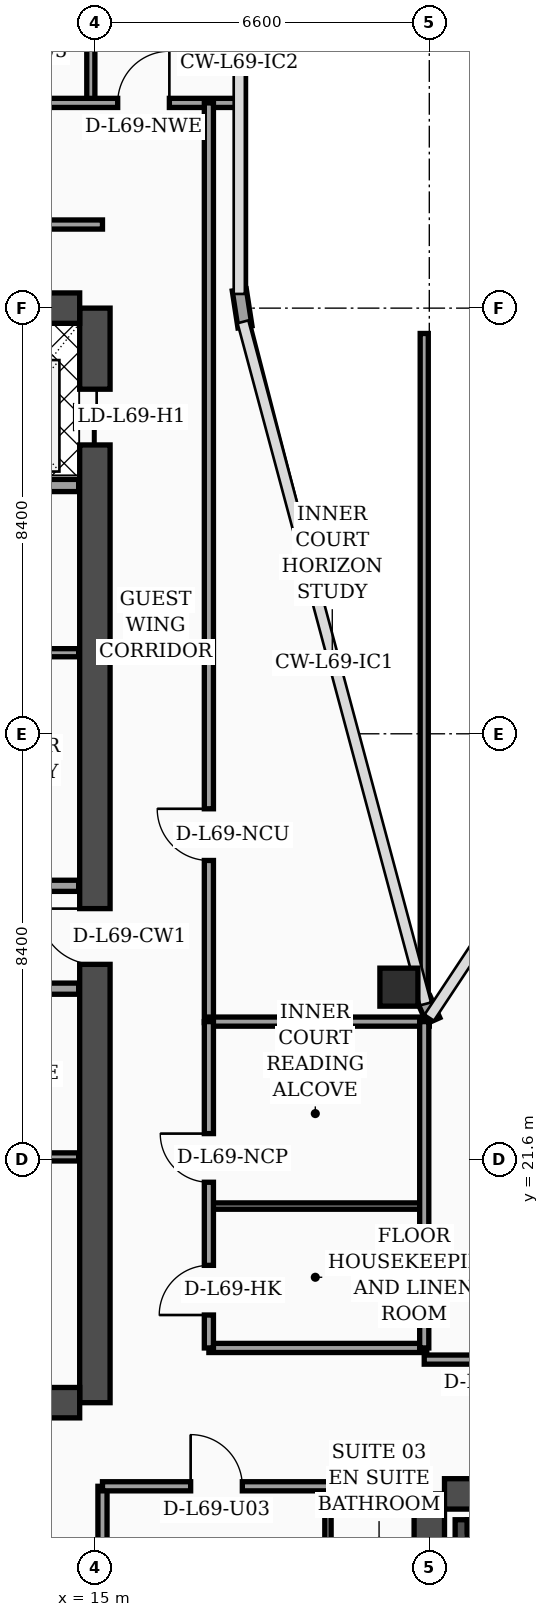
"""IFC4 building model, lengths in metres.
Left out: names, types, materials, properties, quantities, classifications, styles, units other than length and angle.
Written with IfcOpenShell. Run it as: python <this file> out.ifc"""

import sys

from ifc_helpers import new_model, si_unit, direction, frame, frame_2d, origin, origin_2d, place, context, subcontext, project, spatial, rectangle, hollow_rectangle, extrude, element, fill, save


model = new_model("IFC4")
c1 = context("Model", 3, precision=1e-05, world=origin(), true_north=direction((0.0, 1.0)))
c2 = subcontext(c1, "Body", "Model", "MODEL_VIEW")
j1 = project(units=[si_unit("LENGTHUNIT", "METRE"), si_unit("PLANEANGLEUNIT", "RADIAN")], contexts=[c1])
p1 = place(None, origin())
s1 = spatial("IfcSite", under=j1, at=p1, CompositionType="ELEMENT")
p2 = place(p1, origin())
s2 = spatial("IfcBuilding", under=s1, at=p2, CompositionType="ELEMENT")
p3 = place(p2, frame((0.0, 0.0, 278.7)))
s3 = spatial("IfcBuildingStorey", under=s2, at=p3, CompositionType="ELEMENT", Elevation=278.7)
p4 = place(p3, frame((15.0, 16.8, 0.0), z_axis=(0.0, 0.0, 1.0), x_axis=(0.0, 1.0, 0.0)))
e1 = element("IfcWall", 1, at=p4, inside=s3, PredefinedType="SHEAR", context=c2, shape_type="SweptSolid", body=[
    extrude(rectangle(XDim=21.6, YDim=0.6, at=frame_2d((10.8, 0.0))), origin(), (0.0, 0.0, 1.0), 3.52),
])
p5 = place(p4, frame((8.65, 0.0, 0.0)))
e2 = element("IfcOpeningElement", 2, at=p5, cuts=e1, PredefinedType="OPENING", context=c2, shape_type="SweptSolid", body=[
    extrude(rectangle(XDim=1.1, YDim=2.2, at=frame_2d((0.55, 1.1))), frame((0.0, 0.31, 0.0), z_axis=(0.0, -1.0, 0.0), x_axis=(1.0, 0.0, 0.0)), (0.0, 0.0, 1.0), 0.62),
])
p6 = place(p4, frame((18.9, 0.0, 0.0)))
e3 = element("IfcOpeningElement", 3, at=p6, cuts=e1, PredefinedType="OPENING", context=c2, shape_type="SweptSolid", body=[
    extrude(rectangle(XDim=1.1, YDim=2.2, at=frame_2d((0.55, 1.1))), frame((0.0, 0.31, 0.0), z_axis=(0.0, -1.0, 0.0), x_axis=(1.0, 0.0, 0.0)), (0.0, 0.0, 1.0), 0.62),
])
p7 = place(p3, frame((4.5, 38.4, 0.0), z_axis=(0.0, 0.0, 1.0), x_axis=(1.0, 0.0, 0.0)))
e4 = element("IfcWall", 4, at=p7, inside=s3, PredefinedType="SHEAR", context=c2, shape_type="SweptSolid", body=[
    extrude(rectangle(XDim=10.2, YDim=0.6, at=frame_2d((5.1, 0.0))), origin(), (0.0, 0.0, 1.0), 3.52),
])
p8 = place(p7, frame((5.8, 0.0, 0.0)))
e5 = element("IfcOpeningElement", 5, at=p8, cuts=e4, PredefinedType="OPENING", context=c2, shape_type="SweptSolid", body=[
    extrude(rectangle(XDim=1.1, YDim=2.2, at=frame_2d((0.55, 1.1))), frame((0.0, 0.31, 0.0), z_axis=(0.0, -1.0, 0.0), x_axis=(1.0, 0.0, 0.0)), (0.0, 0.0, 1.0), 0.62),
])
p9 = place(p3, frame((4.5, 16.8, 0.0), z_axis=(0.0, 0.0, 1.0), x_axis=(1.0, 0.0, 0.0)))
e6 = element("IfcWall", 6, at=p9, inside=s3, PredefinedType="SHEAR", context=c2, shape_type="SweptSolid", body=[
    extrude(rectangle(XDim=10.2, YDim=0.6, at=frame_2d((5.1, 0.0))), origin(), (0.0, 0.0, 1.0), 3.52),
])
p10 = place(p3, frame((21.6, 4.6, 0.0), z_axis=(0.0, 0.0, 1.0), x_axis=(0.0, 1.0, 0.0)))
e7 = element("IfcWall", 7, at=p10, inside=s3, PredefinedType="SHEAR", context=c2, shape_type="SweptSolid", body=[
    extrude(rectangle(XDim=10.4, YDim=0.6, at=frame_2d((5.2, 0.0))), origin(), (0.0, 0.0, 1.0), 3.52),
])
p11 = place(p3, frame((21.9, 15.0, 0.0), z_axis=(0.0, 0.0, 1.0), x_axis=(1.0, 0.0, 0.0)))
e8 = element("IfcWall", 8, at=p11, inside=s3, PredefinedType="SHEAR", context=c2, shape_type="SweptSolid", body=[
    extrude(rectangle(XDim=10.2, YDim=0.6, at=frame_2d((5.1, 0.0))), origin(), (0.0, 0.0, 1.0), 3.52),
])
p12 = place(p11, frame((5.0, 0.0, 0.0)))
e9 = element("IfcOpeningElement", 9, at=p12, cuts=e8, PredefinedType="OPENING", context=c2, shape_type="SweptSolid", body=[
    extrude(rectangle(XDim=1.1, YDim=2.2, at=frame_2d((0.55, 1.1))), frame((0.0, 0.31, 0.0), z_axis=(0.0, -1.0, 0.0), x_axis=(1.0, 0.0, 0.0)), (0.0, 0.0, 1.0), 0.62),
])
p13 = place(p3, frame((22.23, 4.9, 0.0), z_axis=(0.0, 0.0, 1.0), x_axis=(0.0, 1.0, 0.0)))
e10 = element("IfcWall", 10, at=p13, inside=s3, PredefinedType="SOLIDWALL", context=c2, shape_type="SweptSolid", body=[
    extrude(rectangle(XDim=9.59, YDim=0.24, at=frame_2d((4.795, 0.0))), origin(), (0.0, 0.0, 1.0), 3.52),
])
p14 = place(p3, frame((22.35, 14.37, 0.0), z_axis=(0.0, 0.0, 1.0), x_axis=(1.0, 0.0, 0.0)))
e11 = element("IfcWall", 11, at=p14, inside=s3, PredefinedType="SOLIDWALL", context=c2, shape_type="SweptSolid", body=[
    extrude(rectangle(XDim=3.1, YDim=0.24, at=frame_2d((1.55, 0.0))), origin(), (0.0, 0.0, 1.0), 3.52),
])
p15 = place(p3, frame((21.0, 25.0, 0.0), z_axis=(0.0, 0.0, 1.0), x_axis=(1.0, 0.0, 0.0)))
e12 = element("IfcColumn", 12, at=p15, inside=s3, PredefinedType="COLUMN", context=c2, shape_type="SweptSolid", body=[
    extrude(hollow_rectangle(XDim=0.75, YDim=0.75, WallThickness=0.032, at=origin_2d()), origin(), (0.0, 0.0, 1.0), 3.52),
])
p16 = place(p3, frame((21.68, 24.34, 0.0), z_axis=(0.0, 0.0, 1.0), x_axis=(-0.40758134973, 0.913168901875, 0.0)))
e13 = element("IfcWall", 13, at=p16, inside=s3, PredefinedType="SOLIDWALL", context=c2, shape_type="SweptSolid", body=[
    extrude(rectangle(XDim=0.471, YDim=0.28, at=frame_2d((0.235, 0.0))), origin(), (0.0, 0.0, 1.0), 3.52),
])
p17 = place(p3, frame((17.962, 38.03, 0.0), z_axis=(0.0, 0.0, 1.0), x_axis=(-0.15141125477, 0.988470855377, 0.0)))
e14 = element("IfcWall", 14, at=p17, inside=s3, PredefinedType="SOLIDWALL", context=c2, shape_type="SweptSolid", body=[
    extrude(rectangle(XDim=0.739, YDim=0.28, at=frame_2d((0.369, 0.0))), origin(), (0.0, 0.0, 1.0), 3.52),
])
p18 = place(p3, frame((9.68, 21.65, 0.0), z_axis=(0.0, 0.0, 1.0), x_axis=(1.0, 0.0, 0.0)))
e15 = element("IfcWall", 15, at=p18, inside=s3, PredefinedType="PARTITIONING", context=c2, shape_type="SweptSolid", body=[
    extrude(rectangle(XDim=5.0, YDim=0.16, at=frame_2d((2.5, 0.0))), origin(), (0.0, 0.0, 1.0), 3.52),
])
p19 = place(p18, frame((1.1, 0.0, 0.0)))
e16 = element("IfcOpeningElement", 16, at=p19, cuts=e15, PredefinedType="OPENING", context=c2, shape_type="SweptSolid", body=[
    extrude(rectangle(XDim=0.98, YDim=2.15, at=frame_2d((0.49, 1.075))), frame((0.0, 0.09, 0.0), z_axis=(0.0, -1.0, 0.0), x_axis=(1.0, 0.0, 0.0)), (0.0, 0.0, 1.0), 0.18),
])
p20 = place(p3, frame((9.68, 24.97, 0.0), z_axis=(0.0, 0.0, 1.0), x_axis=(1.0, 0.0, 0.0)))
e17 = element("IfcWall", 17, at=p20, inside=s3, PredefinedType="SOLIDWALL", context=c2, shape_type="SweptSolid", body=[
    extrude(rectangle(XDim=5.0, YDim=0.22, at=frame_2d((2.5, 0.0))), origin(), (0.0, 0.0, 1.0), 2.97),
])
p21 = place(p20, frame((0.9, 0.0, 0.0)))
e18 = element("IfcOpeningElement", 18, at=p21, cuts=e17, PredefinedType="OPENING", context=c2, shape_type="SweptSolid", body=[
    extrude(rectangle(XDim=0.98, YDim=2.15, at=frame_2d((0.49, 1.075))), frame((0.0, 0.12, 0.0), z_axis=(0.0, -1.0, 0.0), x_axis=(1.0, 0.0, 0.0)), (0.0, 0.0, 1.0), 0.24),
])
p22 = place(p3, frame((12.25, 27.0, 0.0), z_axis=(0.0, 0.0, 1.0), x_axis=(1.0, 0.0, 0.0)))
e19 = element("IfcWall", 19, at=p22, inside=s3, PredefinedType="SOLIDWALL", context=c2, shape_type="SweptSolid", body=[
    extrude(rectangle(XDim=2.43, YDim=0.22, at=frame_2d((1.215, 0.0))), origin(), (0.0, 0.0, 1.0), 3.52),
])
p23 = place(p3, frame((12.25, 31.6, 0.0), z_axis=(0.0, 0.0, 1.0), x_axis=(1.0, 0.0, 0.0)))
e20 = element("IfcWall", 20, at=p23, inside=s3, PredefinedType="PARTITIONING", context=c2, shape_type="SweptSolid", body=[
    extrude(rectangle(XDim=2.43, YDim=0.16, at=frame_2d((1.215, 0.0))), origin(), (0.0, 0.0, 1.0), 3.12),
])
p24 = place(p23, frame((0.55, 0.0, 0.0)))
e21 = element("IfcOpeningElement", 21, at=p24, cuts=e20, PredefinedType="OPENING", context=c2, shape_type="SweptSolid", body=[
    extrude(rectangle(XDim=0.98, YDim=2.15, at=frame_2d((0.49, 1.075))), frame((0.0, 0.09, 0.0), z_axis=(0.0, -1.0, 0.0), x_axis=(1.0, 0.0, 0.0)), (0.0, 0.0, 1.0), 0.18),
])
p25 = place(p3, frame((9.66, 34.9, 0.0), z_axis=(0.0, 0.0, 1.0), x_axis=(1.0, 0.0, 0.0)))
e22 = element("IfcWall", 22, at=p25, inside=s3, PredefinedType="SOLIDWALL", context=c2, shape_type="SweptSolid", body=[
    extrude(rectangle(XDim=5.02, YDim=0.24, at=frame_2d((2.51, 0.0))), origin(), (0.0, 0.0, 1.0), 3.52),
])
p26 = place(p3, frame((15.15, 2.44, 0.0), z_axis=(0.0, 0.0, 1.0), x_axis=(0.0, 1.0, 0.0)))
e23 = element("IfcWall", 23, at=p26, inside=s3, PredefinedType="PARTITIONING", context=c2, shape_type="SweptSolid", body=[
    extrude(rectangle(XDim=12.71, YDim=0.18, at=frame_2d((6.355, 0.0))), origin(), (0.0, 0.0, 1.0), 3.07),
])
p27 = place(p3, frame((19.6, 2.44, 0.0), z_axis=(0.0, 0.0, 1.0), x_axis=(0.0, 1.0, 0.0)))
e24 = element("IfcWall", 24, at=p27, inside=s3, PredefinedType="PARTITIONING", context=c2, shape_type="SweptSolid", body=[
    extrude(rectangle(XDim=12.71, YDim=0.125, at=frame_2d((6.355, 0.0))), origin(), (0.0, 0.0, 1.0), 2.57),
])
p28 = place(p27, frame((4.34, 0.0, 0.0)))
e25 = element("IfcOpeningElement", 25, at=p28, cuts=e24, PredefinedType="OPENING", context=c2, shape_type="SweptSolid", body=[
    extrude(rectangle(XDim=0.96, YDim=2.2, at=frame_2d((0.48, 1.1))), frame((0.0, 0.073, 0.0), z_axis=(0.0, -1.0, 0.0), x_axis=(1.0, 0.0, 0.0)), (0.0, 0.0, 1.0), 0.145),
])
p29 = place(p27, frame((10.18, 0.0, 0.0)))
e26 = element("IfcOpeningElement", 26, at=p29, cuts=e24, PredefinedType="OPENING", context=c2, shape_type="SweptSolid", body=[
    extrude(rectangle(XDim=0.9, YDim=2.15, at=frame_2d((0.45, 1.075))), frame((0.0, 0.073, 0.0), z_axis=(0.0, -1.0, 0.0), x_axis=(1.0, 0.0, 0.0)), (0.0, 0.0, 1.0), 0.145),
])
p30 = place(p3, frame((15.15, 15.15, 0.0), z_axis=(0.0, 0.0, 1.0), x_axis=(1.0, 0.0, 0.0)))
e27 = element("IfcWall", 27, at=p30, inside=s3, PredefinedType="PARTITIONING", context=c2, shape_type="SweptSolid", body=[
    extrude(rectangle(XDim=6.45, YDim=0.18, at=frame_2d((3.225, 0.0))), origin(), (0.0, 0.0, 1.0), 2.57),
])
p31 = place(p30, frame((1.74, 0.0, 0.0)))
e28 = element("IfcOpeningElement", 28, at=p31, cuts=e27, PredefinedType="OPENING", context=c2, shape_type="SweptSolid", body=[
    extrude(rectangle(XDim=1.02, YDim=2.2, at=frame_2d((0.51, 1.1))), frame((0.0, 0.1, 0.0), z_axis=(0.0, -1.0, 0.0), x_axis=(1.0, 0.0, 0.0)), (0.0, 0.0, 1.0), 0.2),
])
p32 = place(p3, frame((14.92, 42.45, 0.0), z_axis=(0.0, 0.0, 1.0), x_axis=(0.0, 1.0, 0.0)))
e29 = element("IfcWall", 29, at=p32, inside=s3, PredefinedType="PARTITIONING", context=c2, shape_type="SweptSolid", body=[
    extrude(rectangle(XDim=5.35, YDim=0.16, at=frame_2d((2.675, 0.0))), origin(), (0.0, 0.0, 1.0), 3.07),
])
p33 = place(p3, frame((0.08, 42.45, 0.0), z_axis=(0.0, 0.0, 1.0), x_axis=(1.0, 0.0, 0.0)))
e30 = element("IfcWall", 30, at=p33, inside=s3, PredefinedType="PARTITIONING", context=c2, shape_type="SweptSolid", body=[
    extrude(rectangle(XDim=17.77, YDim=0.18, at=frame_2d((8.885, 0.0))), origin(), (0.0, 0.0, 1.0), 2.97),
])
p34 = place(p33, frame((0.9, 0.0, 0.0)))
e31 = element("IfcOpeningElement", 31, at=p34, cuts=e30, PredefinedType="OPENING", context=c2, shape_type="SweptSolid", body=[
    extrude(rectangle(XDim=1.02, YDim=2.2, at=frame_2d((0.51, 1.1))), frame((0.0, 0.1, 0.0), z_axis=(0.0, -1.0, 0.0), x_axis=(1.0, 0.0, 0.0)), (0.0, 0.0, 1.0), 0.2),
])
p35 = place(p33, frame((4.04, 0.0, 0.0)))
e32 = element("IfcOpeningElement", 32, at=p35, cuts=e30, PredefinedType="OPENING", context=c2, shape_type="SweptSolid", body=[
    extrude(rectangle(XDim=1.02, YDim=2.2, at=frame_2d((0.51, 1.1))), frame((0.0, 0.1, 0.0), z_axis=(0.0, -1.0, 0.0), x_axis=(1.0, 0.0, 0.0)), (0.0, 0.0, 1.0), 0.2),
])
p36 = place(p33, frame((9.92, 0.0, 0.0)))
e33 = element("IfcOpeningElement", 33, at=p36, cuts=e30, PredefinedType="OPENING", context=c2, shape_type="SweptSolid", body=[
    extrude(rectangle(XDim=1.02, YDim=2.2, at=frame_2d((0.51, 1.1))), frame((0.0, 0.1, 0.0), z_axis=(0.0, -1.0, 0.0), x_axis=(1.0, 0.0, 0.0)), (0.0, 0.0, 1.0), 0.2),
])
p37 = place(p33, frame((15.37, 0.0, 0.0)))
e34 = element("IfcOpeningElement", 34, at=p37, cuts=e30, PredefinedType="OPENING", context=c2, shape_type="SweptSolid", body=[
    extrude(rectangle(XDim=1.02, YDim=2.2, at=frame_2d((0.51, 1.1))), frame((0.0, 0.1, 0.0), z_axis=(0.0, -1.0, 0.0), x_axis=(1.0, 0.0, 0.0)), (0.0, 0.0, 1.0), 0.2),
])
p38 = place(p3, frame((17.25, 24.3, 0.0), z_axis=(0.0, 0.0, 1.0), x_axis=(0.0, 1.0, 0.0)))
e35 = element("IfcWall", 35, at=p38, inside=s3, PredefinedType="PARTITIONING", context=c2, shape_type="SweptSolid", body=[
    extrude(rectangle(XDim=18.15, YDim=0.18, at=frame_2d((9.075, 0.0))), origin(), (0.0, 0.0, 1.0), 2.97),
])
p39 = place(p38, frame((3.2, 0.0, 0.0)))
e36 = element("IfcOpeningElement", 36, at=p39, cuts=e35, PredefinedType="OPENING", context=c2, shape_type="SweptSolid", body=[
    extrude(rectangle(XDim=1.02, YDim=2.2, at=frame_2d((0.51, 1.1))), frame((0.0, 0.1, 0.0), z_axis=(0.0, -1.0, 0.0), x_axis=(1.0, 0.0, 0.0)), (0.0, 0.0, 1.0), 0.2),
])
p40 = place(p3, frame((3.88, 40.05, 0.0), z_axis=(0.0, 0.0, 1.0), x_axis=(1.0, 0.0, 0.0)))
e37 = element("IfcWall", 37, at=p40, inside=s3, PredefinedType="PARTITIONING", context=c2, shape_type="SweptSolid", body=[
    extrude(rectangle(XDim=11.27, YDim=0.18, at=frame_2d((5.635, 0.0))), origin(), (0.0, 0.0, 1.0), 2.97),
])
p41 = place(p3, frame((17.25, 17.88, 0.0), z_axis=(0.0, 0.0, 1.0), x_axis=(1.0, 0.0, 0.0)))
e38 = element("IfcWall", 38, at=p41, inside=s3, PredefinedType="PARTITIONING", context=c2, shape_type="SweptSolid", body=[
    extrude(rectangle(XDim=4.3, YDim=0.18, at=frame_2d((2.15, 0.0))), origin(), (0.0, 0.0, 1.0), 3.52),
])
p42 = place(p3, frame((17.25, 20.68, 0.0), z_axis=(0.0, 0.0, 1.0), x_axis=(1.0, 0.0, 0.0)))
e39 = element("IfcWall", 39, at=p42, inside=s3, PredefinedType="PARTITIONING", context=c2, shape_type="SweptSolid", body=[
    extrude(rectangle(XDim=4.3, YDim=0.125, at=frame_2d((2.15, 0.0))), origin(), (0.0, 0.0, 1.0), 3.52),
])
p43 = place(p3, frame((17.25, 24.32, 0.0), z_axis=(0.0, 0.0, 1.0), x_axis=(1.0, 0.0, 0.0)))
e40 = element("IfcWall", 40, at=p43, inside=s3, PredefinedType="PARTITIONING", context=c2, shape_type="SweptSolid", body=[
    extrude(rectangle(XDim=4.35, YDim=0.18, at=frame_2d((2.175, 0.0))), origin(), (0.0, 0.0, 1.0), 3.52),
])
p44 = place(p3, frame((21.5, 17.88, 0.0), z_axis=(0.0, 0.0, 1.0), x_axis=(0.0, 1.0, 0.0)))
e41 = element("IfcWall", 41, at=p44, inside=s3, PredefinedType="PARTITIONING", context=c2, shape_type="SweptSolid", body=[
    extrude(rectangle(XDim=6.44, YDim=0.18, at=frame_2d((3.22, 0.0))), origin(), (0.0, 0.0, 1.0), 3.52),
])
p45 = place(p3, frame((17.25, 17.88, 0.0), z_axis=(0.0, 0.0, 1.0), x_axis=(0.0, 1.0, 0.0)))
e42 = element("IfcWall", 42, at=p45, inside=s3, PredefinedType="PARTITIONING", context=c2, shape_type="SweptSolid", body=[
    extrude(rectangle(XDim=6.44, YDim=0.18, at=frame_2d((3.22, 0.0))), origin(), (0.0, 0.0, 1.0), 3.52),
])
p46 = place(p45, frame((0.65, 0.0, 0.0)))
e43 = element("IfcOpeningElement", 43, at=p46, cuts=e42, PredefinedType="OPENING", context=c2, shape_type="SweptSolid", body=[
    extrude(rectangle(XDim=0.98, YDim=2.15, at=frame_2d((0.49, 1.075))), frame((0.0, 0.1, 0.0), z_axis=(0.0, -1.0, 0.0), x_axis=(1.0, 0.0, 0.0)), (0.0, 0.0, 1.0), 0.2),
])
p47 = place(p45, frame((3.27, 0.0, 0.0)))
e44 = element("IfcOpeningElement", 44, at=p47, cuts=e42, PredefinedType="OPENING", context=c2, shape_type="SweptSolid", body=[
    extrude(rectangle(XDim=0.96, YDim=2.2, at=frame_2d((0.48, 1.1))), frame((0.0, 0.1, 0.0), z_axis=(0.0, -1.0, 0.0), x_axis=(1.0, 0.0, 0.0)), (0.0, 0.0, 1.0), 0.2),
])
p48 = place(p3, frame((21.5, 24.85, 0.0), z_axis=(0.0, 0.0, 1.0), x_axis=(0.0, 1.0, 0.0)))
e45 = element("IfcWall", 45, at=p48, inside=s3, PredefinedType="PARTITIONING", context=c2, shape_type="SweptSolid", body=[
    extrude(rectangle(XDim=13.05, YDim=0.16, at=frame_2d((6.525, 0.0))), origin(), (0.0, 0.0, 1.0), 2.97),
])
p49 = place(p3, frame((21.5, 17.65, 0.0), z_axis=(0.0, 0.0, 1.0), x_axis=(1.0, 0.0, 0.0)))
e46 = element("IfcWall", 46, at=p49, inside=s3, PredefinedType="PARTITIONING", context=c2, shape_type="SweptSolid", body=[
    extrude(rectangle(XDim=6.9, YDim=0.18, at=frame_2d((3.45, 0.0))), origin(), (0.0, 0.0, 1.0), 3.52),
])
p50 = place(p49, frame((0.95, 0.0, 0.0)))
e47 = element("IfcOpeningElement", 47, at=p50, cuts=e46, PredefinedType="OPENING", context=c2, shape_type="SweptSolid", body=[
    extrude(rectangle(XDim=1.02, YDim=2.2, at=frame_2d((0.51, 1.1))), frame((0.0, 0.1, 0.0), z_axis=(0.0, -1.0, 0.0), x_axis=(1.0, 0.0, 0.0)), (0.0, 0.0, 1.0), 0.2),
])
p51 = place(p31, origin())
e48 = element("IfcDoor", 48, at=p51, inside=s3, OperationType="SINGLE_SWING_LEFT", PredefinedType="DOOR", context=c2, shape_type="SweptSolid", body=[
    extrude(rectangle(XDim=1.02, YDim=2.2, at=frame_2d((0.51, 1.1))), frame((0.0, 0.025, 0.0), z_axis=(0.0, -1.0, 0.0), x_axis=(1.0, 0.0, 0.0)), (0.0, 0.0, 1.0), 0.05),
])
fill(e28, e48)
p52 = place(p37, origin())
e49 = element("IfcDoor", 49, at=p52, inside=s3, OperationType="SINGLE_SWING_RIGHT", PredefinedType="DOOR", context=c2, shape_type="SweptSolid", body=[
    extrude(rectangle(XDim=1.02, YDim=2.2, at=frame_2d((0.51, 1.1))), frame((0.0, 0.025, 0.0), z_axis=(0.0, -1.0, 0.0), x_axis=(1.0, 0.0, 0.0)), (0.0, 0.0, 1.0), 0.05),
])
fill(e34, e49)
p53 = place(p39, origin())
e50 = element("IfcDoor", 50, at=p53, inside=s3, OperationType="SINGLE_SWING_RIGHT", PredefinedType="DOOR", context=c2, shape_type="SweptSolid", body=[
    extrude(rectangle(XDim=1.02, YDim=2.2, at=frame_2d((0.51, 1.1))), frame((0.0, 0.025, 0.0), z_axis=(0.0, -1.0, 0.0), x_axis=(1.0, 0.0, 0.0)), (0.0, 0.0, 1.0), 0.05),
])
fill(e36, e50)
p54 = place(p46, origin())
e51 = element("IfcDoor", 51, at=p54, inside=s3, OperationType="SINGLE_SWING_LEFT", PredefinedType="DOOR", context=c2, shape_type="SweptSolid", body=[
    extrude(rectangle(XDim=0.98, YDim=2.15, at=frame_2d((0.49, 1.075))), frame((0.0, 0.025, 0.0), z_axis=(0.0, -1.0, 0.0), x_axis=(1.0, 0.0, 0.0)), (0.0, 0.0, 1.0), 0.05),
])
fill(e43, e51)
p55 = place(p47, origin())
e52 = element("IfcDoor", 52, at=p55, inside=s3, OperationType="SINGLE_SWING_RIGHT", PredefinedType="DOOR", context=c2, shape_type="SweptSolid", body=[
    extrude(rectangle(XDim=0.96, YDim=2.2, at=frame_2d((0.48, 1.1))), frame((0.0, 0.025, 0.0), z_axis=(0.0, -1.0, 0.0), x_axis=(1.0, 0.0, 0.0)), (0.0, 0.0, 1.0), 0.05),
])
fill(e44, e52)
p56 = place(p5, origin())
e53 = element("IfcDoor", 53, at=p56, inside=s3, OperationType="SINGLE_SWING_RIGHT", PredefinedType="DOOR", context=c2, shape_type="SweptSolid", body=[
    extrude(rectangle(XDim=1.1, YDim=2.2, at=frame_2d((0.55, 1.1))), frame((0.0, 0.025, 0.0), z_axis=(0.0, -1.0, 0.0), x_axis=(1.0, 0.0, 0.0)), (0.0, 0.0, 1.0), 0.05),
])
fill(e2, e53)
p57 = place(p6, origin())
e54 = element("IfcDoor", 54, at=p57, inside=s3, OperationType="DOUBLE_DOOR_SLIDING", PredefinedType="DOOR", context=c2, shape_type="SweptSolid", body=[
    extrude(rectangle(XDim=1.1, YDim=2.2, at=frame_2d((0.55, 1.1))), frame((0.0, 0.025, 0.0), z_axis=(0.0, -1.0, 0.0), x_axis=(1.0, 0.0, 0.0)), (0.0, 0.0, 1.0), 0.05),
])
fill(e3, e54)
save(model, sys.argv[1])
